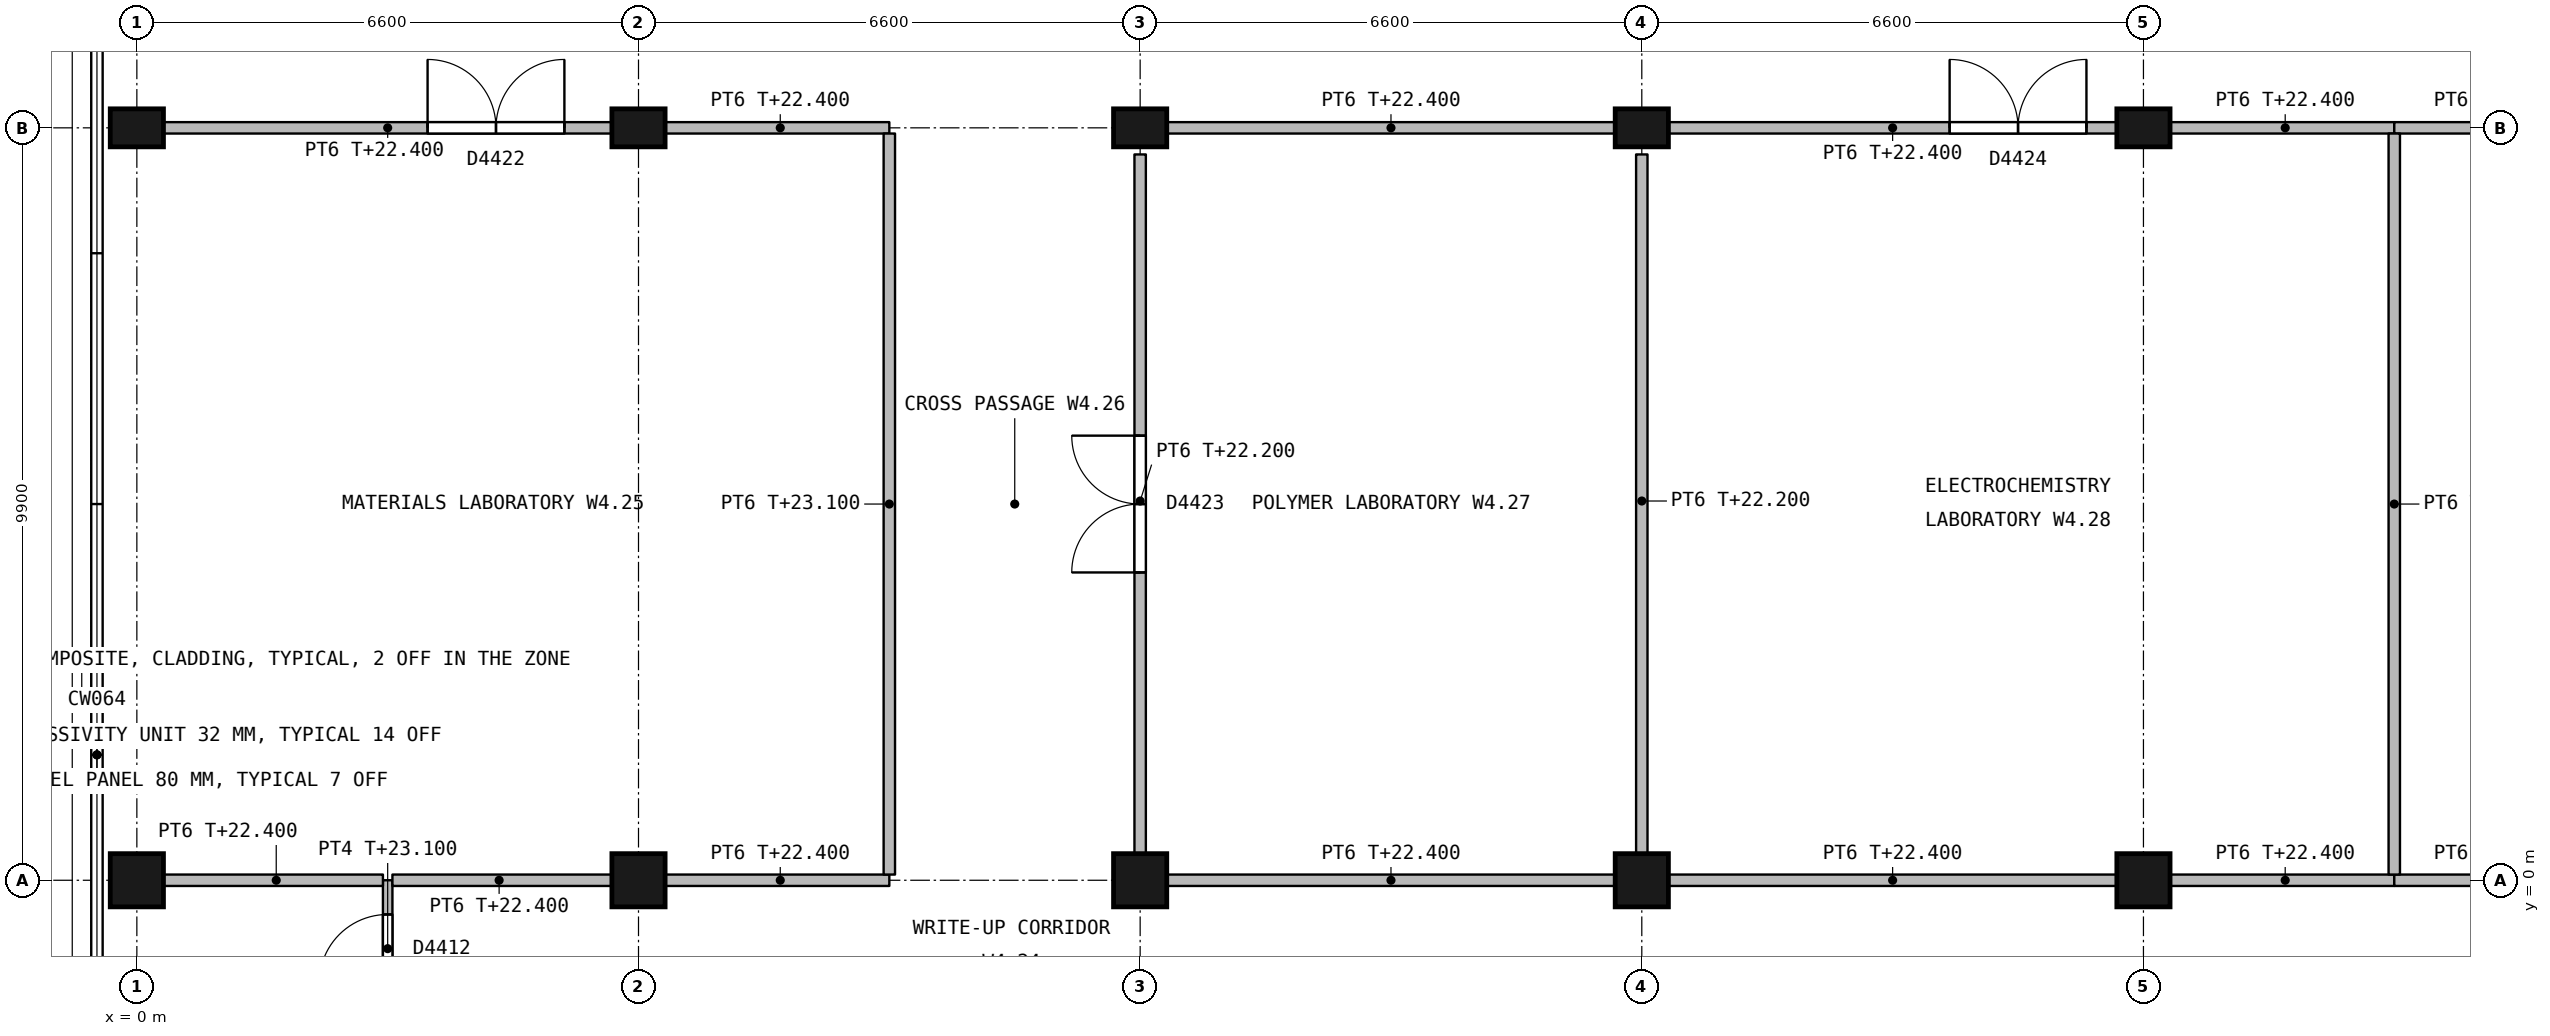
"""IFC4 building model, lengths in metres.
Left out: names, types, materials, properties, quantities, classifications, styles, units other than length and angle.
Written with IfcOpenShell. Run it as: python <this file> out.ifc"""

import sys

from ifc_helpers import new_model, si_unit, direction, frame, frame_2d, origin, origin_with_axes, origin_2d, place, context, subcontext, project, spatial, rectangle, extrude, element, fill, save


model = new_model("IFC4")
c1 = context("Model", 3, precision=1e-05, world=origin(), true_north=direction((0.0, 1.0)))
c2 = subcontext(c1, "Body", "Model", "MODEL_VIEW")
j1 = project(units=[si_unit("LENGTHUNIT", "METRE"), si_unit("PLANEANGLEUNIT", "RADIAN")], contexts=[c1])
p1 = place(None, origin())
s1 = spatial("IfcSite", under=j1, at=p1, CompositionType="ELEMENT")
p2 = place(p1, origin())
s2 = spatial("IfcBuilding", under=s1, at=p2, CompositionType="ELEMENT")
p3 = place(p2, frame((0.0, 0.0, 18.9)))
s3 = spatial("IfcBuildingStorey", under=s2, at=p3, CompositionType="ELEMENT", Elevation=18.9)
p4 = place(p3, origin_with_axes())
e1 = element("IfcColumn", 1, at=p4, inside=s3, PredefinedType="COLUMN", context=c2, shape_type="SweptSolid", body=[
    extrude(rectangle(XDim=0.7, YDim=0.7, at=origin_2d()), origin(), (0.0, 0.0, 1.0), 4.5),
])
p5 = place(p3, frame((0.0, 9.9, 0.0), z_axis=(0.0, 0.0, 1.0), x_axis=(1.0, 0.0, 0.0)))
e2 = element("IfcColumn", 2, at=p5, inside=s3, PredefinedType="COLUMN", context=c2, shape_type="SweptSolid", body=[
    extrude(rectangle(XDim=0.7, YDim=0.5, at=origin_2d()), origin(), (0.0, 0.0, 1.0), 4.5),
])
p6 = place(p3, frame((6.6, 0.0, 0.0), z_axis=(0.0, 0.0, 1.0), x_axis=(1.0, 0.0, 0.0)))
e3 = element("IfcColumn", 3, at=p6, inside=s3, PredefinedType="COLUMN", context=c2, shape_type="SweptSolid", body=[
    extrude(rectangle(XDim=0.7, YDim=0.7, at=origin_2d()), origin(), (0.0, 0.0, 1.0), 4.5),
])
p7 = place(p3, frame((6.6, 9.9, 0.0), z_axis=(0.0, 0.0, 1.0), x_axis=(1.0, 0.0, 0.0)))
e4 = element("IfcColumn", 4, at=p7, inside=s3, PredefinedType="COLUMN", context=c2, shape_type="SweptSolid", body=[
    extrude(rectangle(XDim=0.7, YDim=0.5, at=origin_2d()), origin(), (0.0, 0.0, 1.0), 4.5),
])
p8 = place(p3, frame((13.2, 0.0, 0.0), z_axis=(0.0, 0.0, 1.0), x_axis=(1.0, 0.0, 0.0)))
e5 = element("IfcColumn", 5, at=p8, inside=s3, PredefinedType="COLUMN", context=c2, shape_type="SweptSolid", body=[
    extrude(rectangle(XDim=0.7, YDim=0.7, at=origin_2d()), origin(), (0.0, 0.0, 1.0), 4.5),
])
p9 = place(p3, frame((13.2, 9.9, 0.0), z_axis=(0.0, 0.0, 1.0), x_axis=(1.0, 0.0, 0.0)))
e6 = element("IfcColumn", 6, at=p9, inside=s3, PredefinedType="COLUMN", context=c2, shape_type="SweptSolid", body=[
    extrude(rectangle(XDim=0.7, YDim=0.5, at=origin_2d()), origin(), (0.0, 0.0, 1.0), 4.5),
])
p10 = place(p3, frame((19.8, 0.0, 0.0), z_axis=(0.0, 0.0, 1.0), x_axis=(1.0, 0.0, 0.0)))
e7 = element("IfcColumn", 7, at=p10, inside=s3, PredefinedType="COLUMN", context=c2, shape_type="SweptSolid", body=[
    extrude(rectangle(XDim=0.7, YDim=0.7, at=origin_2d()), origin(), (0.0, 0.0, 1.0), 4.5),
])
p11 = place(p3, frame((19.8, 9.9, 0.0), z_axis=(0.0, 0.0, 1.0), x_axis=(1.0, 0.0, 0.0)))
e8 = element("IfcColumn", 8, at=p11, inside=s3, PredefinedType="COLUMN", context=c2, shape_type="SweptSolid", body=[
    extrude(rectangle(XDim=0.7, YDim=0.5, at=origin_2d()), origin(), (0.0, 0.0, 1.0), 4.5),
])
p12 = place(p3, frame((26.4, 0.0, 0.0), z_axis=(0.0, 0.0, 1.0), x_axis=(1.0, 0.0, 0.0)))
e9 = element("IfcColumn", 9, at=p12, inside=s3, PredefinedType="COLUMN", context=c2, shape_type="SweptSolid", body=[
    extrude(rectangle(XDim=0.7, YDim=0.7, at=origin_2d()), origin(), (0.0, 0.0, 1.0), 4.5),
])
p13 = place(p3, frame((26.4, 9.9, 0.0), z_axis=(0.0, 0.0, 1.0), x_axis=(1.0, 0.0, 0.0)))
e10 = element("IfcColumn", 10, at=p13, inside=s3, PredefinedType="COLUMN", context=c2, shape_type="SweptSolid", body=[
    extrude(rectangle(XDim=0.7, YDim=0.5, at=origin_2d()), origin(), (0.0, 0.0, 1.0), 4.5),
])
p14 = place(p3, frame((0.35, 9.9, 0.0), z_axis=(0.0, 0.0, 1.0), x_axis=(1.0, 0.0, 0.0)))
e11 = element("IfcWall", 11, at=p14, inside=s3, PredefinedType="PARTITIONING", context=c2, shape_type="SweptSolid", body=[
    extrude(rectangle(XDim=5.9, YDim=0.15, at=frame_2d((2.95, 0.0))), origin(), (0.0, 0.0, 1.0), 3.5),
])
p15 = place(p14, frame((3.475, 0.0, 0.0)))
e12 = element("IfcOpeningElement", 12, at=p15, cuts=e11, PredefinedType="OPENING", context=c2, shape_type="SweptSolid", body=[
    extrude(rectangle(XDim=1.8, YDim=2.4, at=frame_2d((0.9, 1.2))), frame((0.0, 0.085, 0.0), z_axis=(0.0, -1.0, 0.0), x_axis=(1.0, 0.0, 0.0)), (0.0, 0.0, 1.0), 0.17),
])
p16 = place(p3, frame((6.95, 9.9, 0.0), z_axis=(0.0, 0.0, 1.0), x_axis=(1.0, 0.0, 0.0)))
e13 = element("IfcWall", 13, at=p16, inside=s3, PredefinedType="PARTITIONING", context=c2, shape_type="SweptSolid", body=[
    extrude(rectangle(XDim=2.95, YDim=0.15, at=frame_2d((1.475, 0.0))), origin(), (0.0, 0.0, 1.0), 3.5),
])
p17 = place(p3, frame((13.55, 9.9, 0.0), z_axis=(0.0, 0.0, 1.0), x_axis=(1.0, 0.0, 0.0)))
e14 = element("IfcWall", 14, at=p17, inside=s3, PredefinedType="PARTITIONING", context=c2, shape_type="SweptSolid", body=[
    extrude(rectangle(XDim=5.9, YDim=0.15, at=frame_2d((2.95, 0.0))), origin(), (0.0, 0.0, 1.0), 3.5),
])
p18 = place(p3, frame((20.15, 9.9, 0.0), z_axis=(0.0, 0.0, 1.0), x_axis=(1.0, 0.0, 0.0)))
e15 = element("IfcWall", 15, at=p18, inside=s3, PredefinedType="PARTITIONING", context=c2, shape_type="SweptSolid", body=[
    extrude(rectangle(XDim=5.9, YDim=0.15, at=frame_2d((2.95, 0.0))), origin(), (0.0, 0.0, 1.0), 3.5),
])
p19 = place(p18, frame((3.7, 0.0, 0.0)))
e16 = element("IfcOpeningElement", 16, at=p19, cuts=e15, PredefinedType="OPENING", context=c2, shape_type="SweptSolid", body=[
    extrude(rectangle(XDim=1.8, YDim=2.4, at=frame_2d((0.9, 1.2))), frame((0.0, 0.085, 0.0), z_axis=(0.0, -1.0, 0.0), x_axis=(1.0, 0.0, 0.0)), (0.0, 0.0, 1.0), 0.17),
])
for number, where, z_axis, x_axis in (
    (17, (26.75, 9.9, 0.0), (0.0, 0.0, 1.0), (1.0, 0.0, 0.0)),
    (18, (29.7, 9.9, 0.0), (0.0, 0.0, 1.0), (1.0, 0.0, 0.0)),
):
    element("IfcWall", number, at=place(p3, frame(where, z_axis=z_axis, x_axis=x_axis)), inside=s3, PredefinedType="PARTITIONING", context=c2, shape_type="SweptSolid", body=[
        extrude(rectangle(XDim=2.95, YDim=0.15, at=frame_2d((1.475, 0.0))), origin(), (0.0, 0.0, 1.0), 3.5),
    ])
p20 = place(p3, frame((3.3, -1.8, 0.0), z_axis=(0.0, 0.0, 1.0), x_axis=(0.0, 1.0, 0.0)))
e19 = element("IfcWall", 19, at=p20, inside=s3, PredefinedType="PARTITIONING", context=c2, shape_type="SweptSolid", body=[
    extrude(rectangle(XDim=1.8, YDim=0.125, at=frame_2d((0.9, 0.0))), origin(), (0.0, 0.0, 1.0), 4.2),
])
p21 = place(p20, frame((0.45, 0.0, 0.0)))
e20 = element("IfcOpeningElement", 20, at=p21, cuts=e19, PredefinedType="OPENING", context=c2, shape_type="SweptSolid", body=[
    extrude(rectangle(XDim=0.9, YDim=2.1, at=frame_2d((0.45, 1.05))), frame((0.0, 0.073, 0.0), z_axis=(0.0, -1.0, 0.0), x_axis=(1.0, 0.0, 0.0)), (0.0, 0.0, 1.0), 0.145),
])
p22 = place(p3, frame((3.238, 0.0, 0.0), z_axis=(0.0, 0.0, 1.0), x_axis=(-1.0, 0.0, 0.0)))
e21 = element("IfcWall", 21, at=p22, inside=s3, PredefinedType="PARTITIONING", context=c2, shape_type="SweptSolid", body=[
    extrude(rectangle(XDim=2.887, YDim=0.15, at=frame_2d((1.444, 0.0))), origin(), (0.0, 0.0, 1.0), 3.5),
])
p23 = place(p3, frame((9.9, 0.0, 0.0), z_axis=(0.0, 0.0, 1.0), x_axis=(-1.0, 0.0, 0.0)))
e22 = element("IfcWall", 22, at=p23, inside=s3, PredefinedType="PARTITIONING", context=c2, shape_type="SweptSolid", body=[
    extrude(rectangle(XDim=2.95, YDim=0.15, at=frame_2d((1.475, 0.0))), origin(), (0.0, 0.0, 1.0), 3.5),
])
p24 = place(p3, frame((6.25, 0.0, 0.0), z_axis=(0.0, 0.0, 1.0), x_axis=(-1.0, 0.0, 0.0)))
e23 = element("IfcWall", 23, at=p24, inside=s3, PredefinedType="PARTITIONING", context=c2, shape_type="SweptSolid", body=[
    extrude(rectangle(XDim=2.887, YDim=0.15, at=frame_2d((1.444, 0.0))), origin(), (0.0, 0.0, 1.0), 3.5),
])
p25 = place(p3, frame((19.45, 0.0, 0.0), z_axis=(0.0, 0.0, 1.0), x_axis=(-1.0, 0.0, 0.0)))
e24 = element("IfcWall", 24, at=p25, inside=s3, PredefinedType="PARTITIONING", context=c2, shape_type="SweptSolid", body=[
    extrude(rectangle(XDim=5.9, YDim=0.15, at=frame_2d((2.95, 0.0))), origin(), (0.0, 0.0, 1.0), 3.5),
])
p26 = place(p3, frame((29.7, 0.0, 0.0), z_axis=(0.0, 0.0, 1.0), x_axis=(-1.0, 0.0, 0.0)))
e25 = element("IfcWall", 25, at=p26, inside=s3, PredefinedType="PARTITIONING", context=c2, shape_type="SweptSolid", body=[
    extrude(rectangle(XDim=2.95, YDim=0.15, at=frame_2d((1.475, 0.0))), origin(), (0.0, 0.0, 1.0), 3.5),
])
p27 = place(p3, frame((26.05, 0.0, 0.0), z_axis=(0.0, 0.0, 1.0), x_axis=(-1.0, 0.0, 0.0)))
e26 = element("IfcWall", 26, at=p27, inside=s3, PredefinedType="PARTITIONING", context=c2, shape_type="SweptSolid", body=[
    extrude(rectangle(XDim=5.9, YDim=0.15, at=frame_2d((2.95, 0.0))), origin(), (0.0, 0.0, 1.0), 3.5),
])
p28 = place(p3, frame((32.65, 0.0, 0.0), z_axis=(0.0, 0.0, 1.0), x_axis=(-1.0, 0.0, 0.0)))
e27 = element("IfcWall", 27, at=p28, inside=s3, PredefinedType="PARTITIONING", context=c2, shape_type="SweptSolid", body=[
    extrude(rectangle(XDim=2.95, YDim=0.15, at=frame_2d((1.475, 0.0))), origin(), (0.0, 0.0, 1.0), 3.5),
])
p29 = place(p3, frame((9.9, 0.075, 0.0), z_axis=(0.0, 0.0, 1.0), x_axis=(0.0, 1.0, 0.0)))
e28 = element("IfcWall", 28, at=p29, inside=s3, PredefinedType="PARTITIONING", context=c2, shape_type="SweptSolid", body=[
    extrude(rectangle(XDim=9.75, YDim=0.15, at=frame_2d((4.875, 0.0))), origin(), (0.0, 0.0, 1.0), 4.2),
])
p30 = place(p3, frame((13.2, 0.35, 0.0), z_axis=(0.0, 0.0, 1.0), x_axis=(0.0, 1.0, 0.0)))
e29 = element("IfcWall", 29, at=p30, inside=s3, PredefinedType="PARTITIONING", context=c2, shape_type="SweptSolid", body=[
    extrude(rectangle(XDim=9.2, YDim=0.15, at=frame_2d((4.6, 0.0))), origin(), (0.0, 0.0, 1.0), 3.3),
])
p31 = place(p30, frame((3.7, 0.0, 0.0)))
e30 = element("IfcOpeningElement", 30, at=p31, cuts=e29, PredefinedType="OPENING", context=c2, shape_type="SweptSolid", body=[
    extrude(rectangle(XDim=1.8, YDim=2.4, at=frame_2d((0.9, 1.2))), frame((0.0, 0.085, 0.0), z_axis=(0.0, -1.0, 0.0), x_axis=(1.0, 0.0, 0.0)), (0.0, 0.0, 1.0), 0.17),
])
p32 = place(p3, frame((19.8, 0.35, 0.0), z_axis=(0.0, 0.0, 1.0), x_axis=(0.0, 1.0, 0.0)))
e31 = element("IfcWall", 31, at=p32, inside=s3, PredefinedType="PARTITIONING", context=c2, shape_type="SweptSolid", body=[
    extrude(rectangle(XDim=9.2, YDim=0.15, at=frame_2d((4.6, 0.0))), origin(), (0.0, 0.0, 1.0), 3.3),
])
p33 = place(p3, frame((29.7, 0.075, 0.0), z_axis=(0.0, 0.0, 1.0), x_axis=(0.0, 1.0, 0.0)))
e32 = element("IfcWall", 32, at=p33, inside=s3, PredefinedType="PARTITIONING", context=c2, shape_type="SweptSolid", body=[
    extrude(rectangle(XDim=9.75, YDim=0.15, at=frame_2d((4.875, 0.0))), origin(), (0.0, 0.0, 1.0), 4.2),
])
p34 = place(p21, origin())
e33 = element("IfcDoor", 33, at=p34, inside=s3, OperationType="SINGLE_SWING_LEFT", PredefinedType="DOOR", context=c2, shape_type="SweptSolid", body=[
    extrude(rectangle(XDim=0.9, YDim=2.1, at=frame_2d((0.45, 1.05))), frame((0.0, 0.027, 0.0), z_axis=(0.0, -1.0, 0.0), x_axis=(1.0, 0.0, 0.0)), (0.0, 0.0, 1.0), 0.054),
])
fill(e20, e33)
p35 = place(p15, origin())
e34 = element("IfcDoor", 34, at=p35, inside=s3, OperationType="DOUBLE_DOOR_SINGLE_SWING", PredefinedType="DOOR", context=c2, shape_type="SweptSolid", body=[
    extrude(rectangle(XDim=1.8, YDim=2.4, at=frame_2d((0.9, 1.2))), frame((0.0, 0.027, 0.0), z_axis=(0.0, -1.0, 0.0), x_axis=(1.0, 0.0, 0.0)), (0.0, 0.0, 1.0), 0.054),
])
fill(e12, e34)
p36 = place(p31, origin())
e35 = element("IfcDoor", 35, at=p36, inside=s3, OperationType="DOUBLE_DOOR_SINGLE_SWING", PredefinedType="DOOR", context=c2, shape_type="SweptSolid", body=[
    extrude(rectangle(XDim=1.8, YDim=2.4, at=frame_2d((0.9, 1.2))), frame((0.0, 0.027, 0.0), z_axis=(0.0, -1.0, 0.0), x_axis=(1.0, 0.0, 0.0)), (0.0, 0.0, 1.0), 0.054),
])
fill(e30, e35)
p37 = place(p19, origin())
e36 = element("IfcDoor", 36, at=p37, inside=s3, OperationType="DOUBLE_DOOR_SINGLE_SWING", PredefinedType="DOOR", context=c2, shape_type="SweptSolid", body=[
    extrude(rectangle(XDim=1.8, YDim=2.4, at=frame_2d((0.9, 1.2))), frame((0.0, 0.027, 0.0), z_axis=(0.0, -1.0, 0.0), x_axis=(1.0, 0.0, 0.0)), (0.0, 0.0, 1.0), 0.054),
])
fill(e16, e36)
save(model, sys.argv[1])
